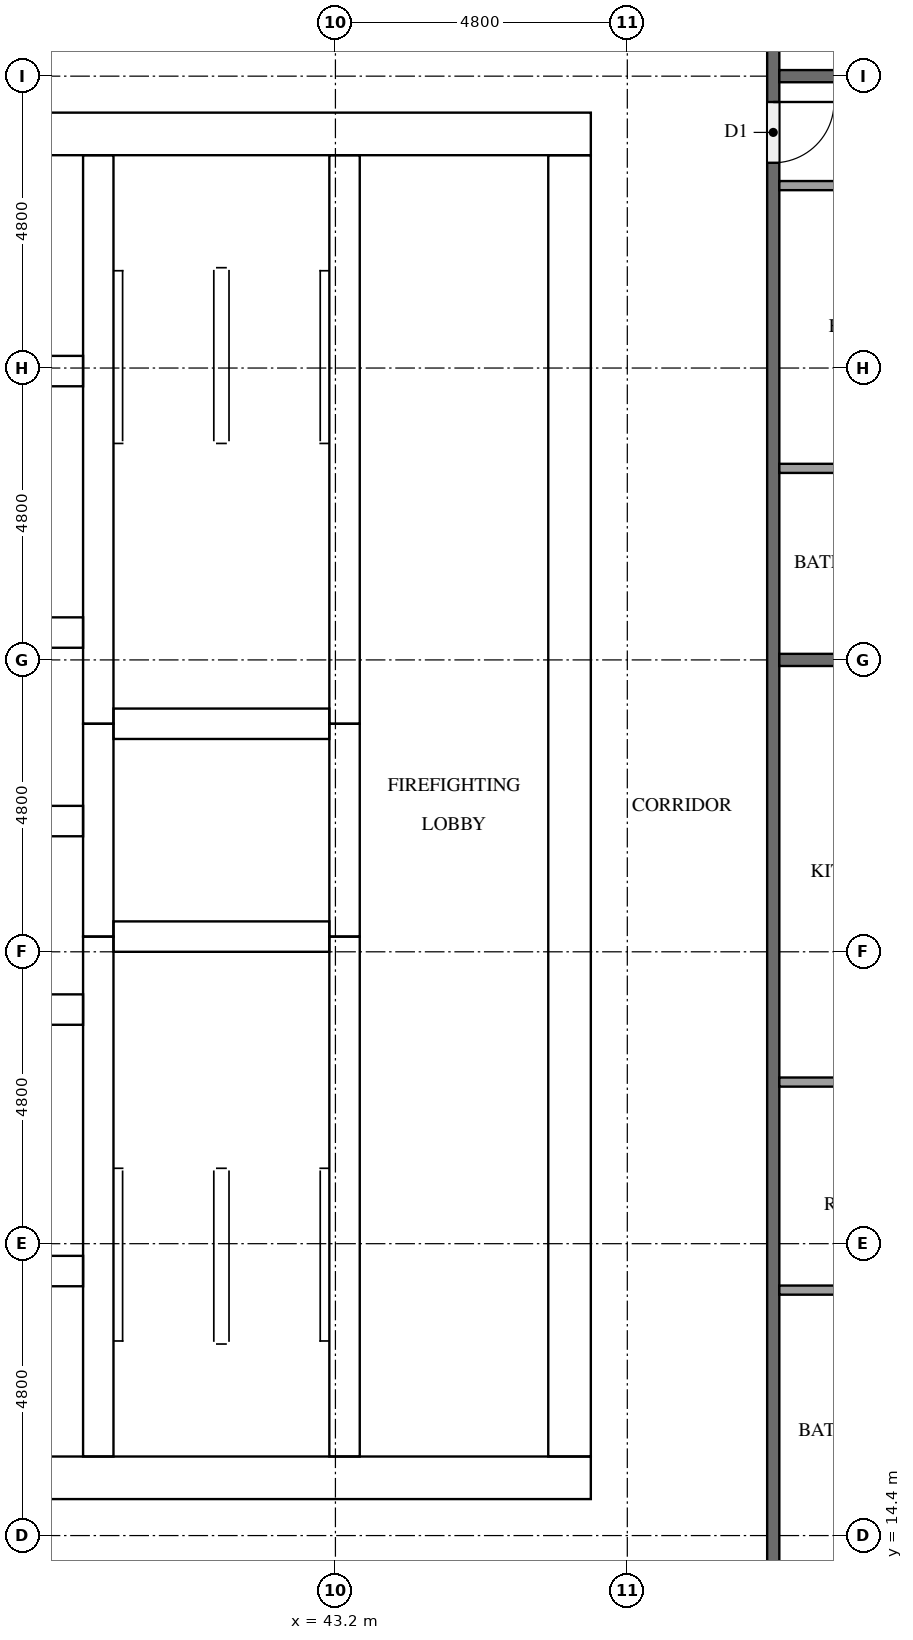
"""IFC4 building model, lengths in metres.
Left out: names, types, materials, properties, quantities, classifications, styles, units other than length and angle.
Written with IfcOpenShell. Run it as: python <this file> out.ifc"""

import sys

from ifc_helpers import new_model, si_unit, direction, frame, frame_2d, origin, place, context, subcontext, project, spatial, rectangle, extrude, element, fill, save


model = new_model("IFC4")
c1 = context("Model", 3, precision=1e-05, world=origin(), true_north=direction((0.0, 1.0)))
c2 = subcontext(c1, "Body", "Model", "MODEL_VIEW")
j1 = project(units=[si_unit("LENGTHUNIT", "METRE"), si_unit("PLANEANGLEUNIT", "RADIAN")], contexts=[c1])
p1 = place(None, origin())
s1 = spatial("IfcSite", under=j1, at=p1, CompositionType="ELEMENT")
p2 = place(p1, origin())
s2 = spatial("IfcBuilding", under=s1, at=p2, CompositionType="ELEMENT")
p3 = place(p2, frame((0.0, 0.0, 229.8)))
s3 = spatial("IfcBuildingStorey", under=s2, at=p3, CompositionType="ELEMENT", Elevation=229.8)
p4 = place(p3, frame((15.0, 15.35, 0.0), z_axis=(0.0, 0.0, 1.0), x_axis=(1.0, 0.0, 0.0)))
e1 = element("IfcWall", 1, at=p4, inside=s3, PredefinedType="SHEAR", context=c2, shape_type="SweptSolid", body=[
    extrude(rectangle(XDim=32.4, YDim=0.7, at=frame_2d((16.2, 0.0))), origin(), (0.0, 0.0, 1.0), 3.1),
])
p5 = place(p4, frame((15.3, 0.0, 0.0)))
e2 = element("IfcOpeningElement", 2, at=p5, cuts=e1, PredefinedType="OPENING", context=c2, shape_type="SweptSolid", body=[
    extrude(rectangle(XDim=1.8, YDim=2.1, at=frame_2d((0.9, 1.05))), frame((0.0, 0.36, 0.0), z_axis=(0.0, -1.0, 0.0), x_axis=(1.0, 0.0, 0.0)), (0.0, 0.0, 1.0), 0.72),
])
p6 = place(p3, frame((15.0, 37.45, 0.0), z_axis=(0.0, 0.0, 1.0), x_axis=(1.0, 0.0, 0.0)))
e3 = element("IfcWall", 3, at=p6, inside=s3, PredefinedType="SHEAR", context=c2, shape_type="SweptSolid", body=[
    extrude(rectangle(XDim=32.4, YDim=0.7, at=frame_2d((16.2, 0.0))), origin(), (0.0, 0.0, 1.0), 3.1),
])
p7 = place(p6, frame((15.3, 0.0, 0.0)))
e4 = element("IfcOpeningElement", 4, at=p7, cuts=e3, PredefinedType="OPENING", context=c2, shape_type="SweptSolid", body=[
    extrude(rectangle(XDim=1.8, YDim=2.1, at=frame_2d((0.9, 1.05))), frame((0.0, 0.36, 0.0), z_axis=(0.0, -1.0, 0.0), x_axis=(1.0, 0.0, 0.0)), (0.0, 0.0, 1.0), 0.72),
])
p8 = place(p6, frame((1.544, 0.0, 0.0)))
e5 = element("IfcOpeningElement", 5, at=p8, cuts=e3, PredefinedType="OPENING", context=c2, shape_type="SweptSolid", body=[
    extrude(rectangle(XDim=1.0, YDim=2.1, at=frame_2d((0.5, 1.05))), frame((0.0, 0.36, 0.0), z_axis=(0.0, -1.0, 0.0), x_axis=(1.0, 0.0, 0.0)), (0.0, 0.0, 1.0), 0.72),
])
p9 = place(p6, frame((5.219, 0.0, 0.0)))
e6 = element("IfcOpeningElement", 6, at=p9, cuts=e3, PredefinedType="OPENING", context=c2, shape_type="SweptSolid", body=[
    extrude(rectangle(XDim=1.0, YDim=2.1, at=frame_2d((0.5, 1.05))), frame((0.0, 0.36, 0.0), z_axis=(0.0, -1.0, 0.0), x_axis=(1.0, 0.0, 0.0)), (0.0, 0.0, 1.0), 0.72),
])
p10 = place(p3, frame((47.05, 15.7, 0.0), z_axis=(0.0, 0.0, 1.0), x_axis=(0.0, 1.0, 0.0)))
e7 = element("IfcWall", 7, at=p10, inside=s3, PredefinedType="SHEAR", context=c2, shape_type="SweptSolid", body=[
    extrude(rectangle(XDim=21.4, YDim=0.7, at=frame_2d((10.7, 0.0))), origin(), (0.0, 0.0, 1.0), 3.1),
])
p11 = place(p10, frame((10.4, 0.0, 0.0)))
e8 = element("IfcOpeningElement", 8, at=p11, cuts=e7, PredefinedType="OPENING", context=c2, shape_type="SweptSolid", body=[
    extrude(rectangle(XDim=1.2, YDim=2.1, at=frame_2d((0.6, 1.05))), frame((0.0, 0.36, 0.0), z_axis=(0.0, -1.0, 0.0), x_axis=(1.0, 0.0, 0.0)), (0.0, 0.0, 1.0), 0.72),
])
p12 = place(p3, frame((39.3, 15.7, 0.0), z_axis=(0.0, 0.0, 1.0), x_axis=(0.0, 1.0, 0.0)))
e9 = element("IfcWall", 9, at=p12, inside=s3, PredefinedType="SHEAR", context=c2, shape_type="SweptSolid", body=[
    extrude(rectangle(XDim=8.55, YDim=0.5, at=frame_2d((4.275, 0.0))), origin(), (0.0, 0.0, 1.0), 3.1),
])
p13 = place(p3, frame((39.3, 24.25, 0.0), z_axis=(0.0, 0.0, 1.0), x_axis=(0.0, 1.0, 0.0)))
e10 = element("IfcWall", 10, at=p13, inside=s3, PredefinedType="SHEAR", context=c2, shape_type="SweptSolid", body=[
    extrude(rectangle(XDim=3.5, YDim=0.5, at=frame_2d((1.75, 0.0))), origin(), (0.0, 0.0, 1.0), 3.1),
])
p14 = place(p3, frame((39.3, 27.75, 0.0), z_axis=(0.0, 0.0, 1.0), x_axis=(0.0, 1.0, 0.0)))
e11 = element("IfcWall", 11, at=p14, inside=s3, PredefinedType="SHEAR", context=c2, shape_type="SweptSolid", body=[
    extrude(rectangle(XDim=9.35, YDim=0.5, at=frame_2d((4.675, 0.0))), origin(), (0.0, 0.0, 1.0), 3.1),
])
p15 = place(p3, frame((43.35, 15.7, 0.0), z_axis=(0.0, 0.0, 1.0), x_axis=(0.0, 1.0, 0.0)))
e12 = element("IfcWall", 12, at=p15, inside=s3, PredefinedType="SHEAR", context=c2, shape_type="SweptSolid", body=[
    extrude(rectangle(XDim=8.55, YDim=0.5, at=frame_2d((4.275, 0.0))), origin(), (0.0, 0.0, 1.0), 3.1),
])
p16 = place(p15, frame((0.5, 0.0, 0.0)))
e13 = element("IfcOpeningElement", 13, at=p16, cuts=e12, PredefinedType="OPENING", context=c2, shape_type="SweptSolid", body=[
    extrude(rectangle(XDim=1.2, YDim=2.1, at=frame_2d((0.6, 1.05))), frame((0.0, 0.26, 0.0), z_axis=(0.0, -1.0, 0.0), x_axis=(1.0, 0.0, 0.0)), (0.0, 0.0, 1.0), 0.52),
])
p17 = place(p3, frame((43.35, 24.25, 0.0), z_axis=(0.0, 0.0, 1.0), x_axis=(0.0, 1.0, 0.0)))
e14 = element("IfcWall", 14, at=p17, inside=s3, PredefinedType="SHEAR", context=c2, shape_type="SweptSolid", body=[
    extrude(rectangle(XDim=3.5, YDim=0.5, at=frame_2d((1.75, 0.0))), origin(), (0.0, 0.0, 1.0), 3.1),
])
p18 = place(p17, frame((1.2, 0.0, 0.0)))
e15 = element("IfcOpeningElement", 15, at=p18, cuts=e14, PredefinedType="OPENING", context=c2, shape_type="SweptSolid", body=[
    extrude(rectangle(XDim=1.1, YDim=2.1, at=frame_2d((0.55, 1.05))), frame((0.0, 0.26, 0.0), z_axis=(0.0, -1.0, 0.0), x_axis=(1.0, 0.0, 0.0)), (0.0, 0.0, 1.0), 0.52),
])
p19 = place(p3, frame((43.35, 27.75, 0.0), z_axis=(0.0, 0.0, 1.0), x_axis=(0.0, 1.0, 0.0)))
e16 = element("IfcWall", 16, at=p19, inside=s3, PredefinedType="SHEAR", context=c2, shape_type="SweptSolid", body=[
    extrude(rectangle(XDim=9.35, YDim=0.5, at=frame_2d((4.675, 0.0))), origin(), (0.0, 0.0, 1.0), 3.1),
])
p20 = place(p19, frame((7.65, 0.0, 0.0)))
e17 = element("IfcOpeningElement", 17, at=p20, cuts=e16, PredefinedType="OPENING", context=c2, shape_type="SweptSolid", body=[
    extrude(rectangle(XDim=1.2, YDim=2.1, at=frame_2d((0.6, 1.05))), frame((0.0, 0.26, 0.0), z_axis=(0.0, -1.0, 0.0), x_axis=(1.0, 0.0, 0.0)), (0.0, 0.0, 1.0), 0.52),
])
for number, where, z_axis, x_axis in (
    (18, (39.55, 24.25, 0.0), (0.0, 0.0, 1.0), (1.0, 0.0, 0.0)),
    (19, (39.55, 27.75, 0.0), (0.0, 0.0, 1.0), (1.0, 0.0, 0.0)),
):
    element("IfcWall", number, at=place(p3, frame(where, z_axis=z_axis, x_axis=x_axis)), inside=s3, PredefinedType="SHEAR", context=c2, shape_type="SweptSolid", body=[
        extrude(rectangle(XDim=3.55, YDim=0.5, at=frame_2d((1.775, 0.0))), origin(), (0.0, 0.0, 1.0), 3.1),
    ])
p21 = place(p3, frame((33.45, 18.75, 0.0), z_axis=(0.0, 0.0, 1.0), x_axis=(1.0, 0.0, 0.0)))
e20 = element("IfcWall", 20, at=p21, inside=s3, PredefinedType="SHEAR", context=c2, shape_type="SweptSolid", body=[
    extrude(rectangle(XDim=5.6, YDim=0.5, at=frame_2d((2.8, 0.0))), origin(), (0.0, 0.0, 1.0), 3.1),
])
p22 = place(p21, frame((2.55, 0.0, 0.0)))
e21 = element("IfcOpeningElement", 21, at=p22, cuts=e20, PredefinedType="OPENING", context=c2, shape_type="SweptSolid", body=[
    extrude(rectangle(XDim=1.0, YDim=2.1, at=frame_2d((0.5, 1.05))), frame((0.0, 0.26, 0.0), z_axis=(0.0, -1.0, 0.0), x_axis=(1.0, 0.0, 0.0)), (0.0, 0.0, 1.0), 0.52),
])
p23 = place(p3, frame((23.35, 23.05, 0.0), z_axis=(0.0, 0.0, 1.0), x_axis=(1.0, 0.0, 0.0)))
e22 = element("IfcWall", 22, at=p23, inside=s3, PredefinedType="SHEAR", context=c2, shape_type="SweptSolid", body=[
    extrude(rectangle(XDim=15.7, YDim=0.5, at=frame_2d((7.85, 0.0))), origin(), (0.0, 0.0, 1.0), 3.1),
])
p24 = place(p23, frame((2.05, 0.0, 0.0)))
e23 = element("IfcOpeningElement", 23, at=p24, cuts=e22, PredefinedType="OPENING", context=c2, shape_type="SweptSolid", body=[
    extrude(rectangle(XDim=1.0, YDim=2.1, at=frame_2d((0.5, 1.05))), frame((0.0, 0.26, 0.0), z_axis=(0.0, -1.0, 0.0), x_axis=(1.0, 0.0, 0.0)), (0.0, 0.0, 1.0), 0.52),
])
p25 = place(p23, frame((12.65, 0.0, 0.0)))
e24 = element("IfcOpeningElement", 24, at=p25, cuts=e22, PredefinedType="OPENING", context=c2, shape_type="SweptSolid", body=[
    extrude(rectangle(XDim=1.0, YDim=2.1, at=frame_2d((0.5, 1.05))), frame((0.0, 0.26, 0.0), z_axis=(0.0, -1.0, 0.0), x_axis=(1.0, 0.0, 0.0)), (0.0, 0.0, 1.0), 0.52),
])
p26 = place(p3, frame((23.35, 26.15, 0.0), z_axis=(0.0, 0.0, 1.0), x_axis=(1.0, 0.0, 0.0)))
e25 = element("IfcWall", 25, at=p26, inside=s3, PredefinedType="SHEAR", context=c2, shape_type="SweptSolid", body=[
    extrude(rectangle(XDim=15.7, YDim=0.5, at=frame_2d((7.85, 0.0))), origin(), (0.0, 0.0, 1.0), 3.1),
])
p27 = place(p3, frame((23.35, 29.25, 0.0), z_axis=(0.0, 0.0, 1.0), x_axis=(1.0, 0.0, 0.0)))
e26 = element("IfcWall", 26, at=p27, inside=s3, PredefinedType="SHEAR", context=c2, shape_type="SweptSolid", body=[
    extrude(rectangle(XDim=15.7, YDim=0.5, at=frame_2d((7.85, 0.0))), origin(), (0.0, 0.0, 1.0), 3.1),
])
p28 = place(p27, frame((0.675, 0.0, 0.0)))
e27 = element("IfcOpeningElement", 27, at=p28, cuts=e26, PredefinedType="OPENING", context=c2, shape_type="SweptSolid", body=[
    extrude(rectangle(XDim=1.1, YDim=2.1, at=frame_2d((0.55, 1.05))), frame((0.0, 0.26, 0.0), z_axis=(0.0, -1.0, 0.0), x_axis=(1.0, 0.0, 0.0)), (0.0, 0.0, 1.0), 0.52),
])
p29 = place(p27, frame((3.325, 0.0, 0.0)))
e28 = element("IfcOpeningElement", 28, at=p29, cuts=e26, PredefinedType="OPENING", context=c2, shape_type="SweptSolid", body=[
    extrude(rectangle(XDim=1.1, YDim=2.1, at=frame_2d((0.55, 1.05))), frame((0.0, 0.26, 0.0), z_axis=(0.0, -1.0, 0.0), x_axis=(1.0, 0.0, 0.0)), (0.0, 0.0, 1.0), 0.52),
])
p30 = place(p27, frame((5.975, 0.0, 0.0)))
e29 = element("IfcOpeningElement", 29, at=p30, cuts=e26, PredefinedType="OPENING", context=c2, shape_type="SweptSolid", body=[
    extrude(rectangle(XDim=1.1, YDim=2.1, at=frame_2d((0.55, 1.05))), frame((0.0, 0.26, 0.0), z_axis=(0.0, -1.0, 0.0), x_axis=(1.0, 0.0, 0.0)), (0.0, 0.0, 1.0), 0.52),
])
p31 = place(p27, frame((8.625, 0.0, 0.0)))
e30 = element("IfcOpeningElement", 30, at=p31, cuts=e26, PredefinedType="OPENING", context=c2, shape_type="SweptSolid", body=[
    extrude(rectangle(XDim=1.1, YDim=2.1, at=frame_2d((0.55, 1.05))), frame((0.0, 0.26, 0.0), z_axis=(0.0, -1.0, 0.0), x_axis=(1.0, 0.0, 0.0)), (0.0, 0.0, 1.0), 0.52),
])
p32 = place(p27, frame((11.275, 0.0, 0.0)))
e31 = element("IfcOpeningElement", 31, at=p32, cuts=e26, PredefinedType="OPENING", context=c2, shape_type="SweptSolid", body=[
    extrude(rectangle(XDim=1.1, YDim=2.1, at=frame_2d((0.55, 1.05))), frame((0.0, 0.26, 0.0), z_axis=(0.0, -1.0, 0.0), x_axis=(1.0, 0.0, 0.0)), (0.0, 0.0, 1.0), 0.52),
])
p33 = place(p27, frame((13.925, 0.0, 0.0)))
e32 = element("IfcOpeningElement", 32, at=p33, cuts=e26, PredefinedType="OPENING", context=c2, shape_type="SweptSolid", body=[
    extrude(rectangle(XDim=1.1, YDim=2.1, at=frame_2d((0.55, 1.05))), frame((0.0, 0.26, 0.0), z_axis=(0.0, -1.0, 0.0), x_axis=(1.0, 0.0, 0.0)), (0.0, 0.0, 1.0), 0.52),
])
p34 = place(p3, frame((33.45, 33.55, 0.0), z_axis=(0.0, 0.0, 1.0), x_axis=(1.0, 0.0, 0.0)))
e33 = element("IfcWall", 33, at=p34, inside=s3, PredefinedType="SHEAR", context=c2, shape_type="SweptSolid", body=[
    extrude(rectangle(XDim=5.6, YDim=0.5, at=frame_2d((2.8, 0.0))), origin(), (0.0, 0.0, 1.0), 3.1),
])
p35 = place(p34, frame((2.55, 0.0, 0.0)))
e34 = element("IfcOpeningElement", 34, at=p35, cuts=e33, PredefinedType="OPENING", context=c2, shape_type="SweptSolid", body=[
    extrude(rectangle(XDim=1.0, YDim=2.1, at=frame_2d((0.5, 1.05))), frame((0.0, 0.26, 0.0), z_axis=(0.0, -1.0, 0.0), x_axis=(1.0, 0.0, 0.0)), (0.0, 0.0, 1.0), 0.52),
])
p36 = place(p3, frame((50.4, 40.7, 0.0), z_axis=(0.0, 0.0, 1.0), x_axis=(0.0, -1.0, 0.0)))
e35 = element("IfcWall", 35, at=p36, inside=s3, PredefinedType="PARTITIONING", context=c2, shape_type="SweptSolid", body=[
    extrude(rectangle(XDim=28.6, YDim=0.2, at=frame_2d((14.3, 0.0))), origin(), (0.0, 0.0, 1.0), 3.1),
])
p37 = place(p36, frame((27.275, 0.0, 0.0)))
e36 = element("IfcOpeningElement", 36, at=p37, cuts=e35, PredefinedType="OPENING", context=c2, shape_type="SweptSolid", body=[
    extrude(rectangle(XDim=1.0, YDim=2.1, at=frame_2d((0.5, 1.05))), frame((0.0, 0.11, 0.0), z_axis=(0.0, -1.0, 0.0), x_axis=(1.0, 0.0, 0.0)), (0.0, 0.0, 1.0), 0.22),
])
p38 = place(p36, frame((2.725, 0.0, 0.0)))
e37 = element("IfcOpeningElement", 37, at=p38, cuts=e35, PredefinedType="OPENING", context=c2, shape_type="SweptSolid", body=[
    extrude(rectangle(XDim=1.0, YDim=2.1, at=frame_2d((0.5, 1.05))), frame((0.0, 0.11, 0.0), z_axis=(0.0, -1.0, 0.0), x_axis=(1.0, 0.0, 0.0)), (0.0, 0.0, 1.0), 0.22),
])
p39 = place(p36, frame((0.875, 0.0, 0.0)))
e38 = element("IfcOpeningElement", 38, at=p39, cuts=e35, PredefinedType="OPENING", context=c2, shape_type="SweptSolid", body=[
    extrude(rectangle(XDim=1.0, YDim=2.1, at=frame_2d((0.5, 1.05))), frame((0.0, 0.11, 0.0), z_axis=(0.0, -1.0, 0.0), x_axis=(1.0, 0.0, 0.0)), (0.0, 0.0, 1.0), 0.22),
])
for number, where, z_axis, x_axis in (
    (39, (50.5, 28.8, 0.0), (0.0, 0.0, 1.0), (1.0, 0.0, 0.0)),
    (40, (50.5, 38.4, 0.0), (0.0, 0.0, 1.0), (1.0, 0.0, 0.0)),
):
    element("IfcWall", number, at=place(p3, frame(where, z_axis=z_axis, x_axis=x_axis)), inside=s3, PredefinedType="PARTITIONING", context=c2, shape_type="SweptSolid", body=[
        extrude(rectangle(XDim=11.575, YDim=0.2, at=frame_2d((5.788, 0.0))), origin(), (0.0, 0.0, 1.0), 3.1),
    ])
for number, where, z_axis, x_axis in (
    (41, (50.5, 18.437, 0.0), (0.0, 0.0, 1.0), (1.0, 0.0, 0.0)),
    (42, (50.5, 21.858, 0.0), (0.0, 0.0, 1.0), (1.0, 0.0, 0.0)),
):
    element("IfcWall", number, at=place(p3, frame(where, z_axis=z_axis, x_axis=x_axis)), inside=s3, PredefinedType="PARTITIONING", context=c2, shape_type="SweptSolid", body=[
        extrude(rectangle(XDim=3.125, YDim=0.15, at=frame_2d((1.562, 0.0))), origin(), (0.0, 0.0, 1.0), 3.1),
    ])
p40 = place(p3, frame((50.5, 31.95, 0.0), z_axis=(0.0, 0.0, 1.0), x_axis=(1.0, 0.0, 0.0)))
e43 = element("IfcWall", 43, at=p40, inside=s3, PredefinedType="PARTITIONING", context=c2, shape_type="SweptSolid", body=[
    extrude(rectangle(XDim=3.725, YDim=0.15, at=frame_2d((1.863, 0.0))), origin(), (0.0, 0.0, 1.0), 3.1),
])
p41 = place(p3, frame((50.5, 36.6, 0.0), z_axis=(0.0, 0.0, 1.0), x_axis=(1.0, 0.0, 0.0)))
e44 = element("IfcWall", 44, at=p41, inside=s3, PredefinedType="PARTITIONING", context=c2, shape_type="SweptSolid", body=[
    extrude(rectangle(XDim=3.875, YDim=0.15, at=frame_2d((1.938, 0.0))), origin(), (0.0, 0.0, 1.0), 3.1),
])
p42 = place(p18, origin())
e45 = element("IfcDoor", 45, at=p42, inside=s3, OperationType="DOUBLE_DOOR_SLIDING", PredefinedType="DOOR", context=c2, shape_type="SweptSolid", body=[
    extrude(rectangle(XDim=1.1, YDim=2.1, at=frame_2d((0.55, 1.05))), frame((0.0, 0.025, 0.0), z_axis=(0.0, -1.0, 0.0), x_axis=(1.0, 0.0, 0.0)), (0.0, 0.0, 1.0), 0.05),
])
fill(e15, e45)
p43 = place(p16, origin())
e46 = element("IfcDoor", 46, at=p43, inside=s3, OperationType="SINGLE_SWING_LEFT", PredefinedType="DOOR", context=c2, shape_type="SweptSolid", body=[
    extrude(rectangle(XDim=1.2, YDim=2.1, at=frame_2d((0.6, 1.05))), frame((0.0, 0.025, 0.0), z_axis=(0.0, -1.0, 0.0), x_axis=(1.0, 0.0, 0.0)), (0.0, 0.0, 1.0), 0.05),
])
fill(e13, e46)
p44 = place(p20, origin())
e47 = element("IfcDoor", 47, at=p44, inside=s3, OperationType="SINGLE_SWING_RIGHT", PredefinedType="DOOR", context=c2, shape_type="SweptSolid", body=[
    extrude(rectangle(XDim=1.2, YDim=2.1, at=frame_2d((0.6, 1.05))), frame((0.0, 0.025, 0.0), z_axis=(0.0, -1.0, 0.0), x_axis=(1.0, 0.0, 0.0)), (0.0, 0.0, 1.0), 0.05),
])
fill(e17, e47)
p45 = place(p11, origin())
e48 = element("IfcDoor", 48, at=p45, inside=s3, OperationType="SINGLE_SWING_RIGHT", PredefinedType="DOOR", context=c2, shape_type="SweptSolid", body=[
    extrude(rectangle(XDim=1.2, YDim=2.1, at=frame_2d((0.6, 1.05))), frame((0.0, 0.025, 0.0), z_axis=(0.0, -1.0, 0.0), x_axis=(1.0, 0.0, 0.0)), (0.0, 0.0, 1.0), 0.05),
])
fill(e8, e48)
p46 = place(p38, origin())
e49 = element("IfcDoor", 49, at=p46, inside=s3, OperationType="SINGLE_SWING_LEFT", PredefinedType="DOOR", context=c2, shape_type="SweptSolid", body=[
    extrude(rectangle(XDim=1.0, YDim=2.1, at=frame_2d((0.5, 1.05))), frame((0.0, 0.025, 0.0), z_axis=(0.0, -1.0, 0.0), x_axis=(1.0, 0.0, 0.0)), (0.0, 0.0, 1.0), 0.05),
])
fill(e37, e49)
save(model, sys.argv[1])
